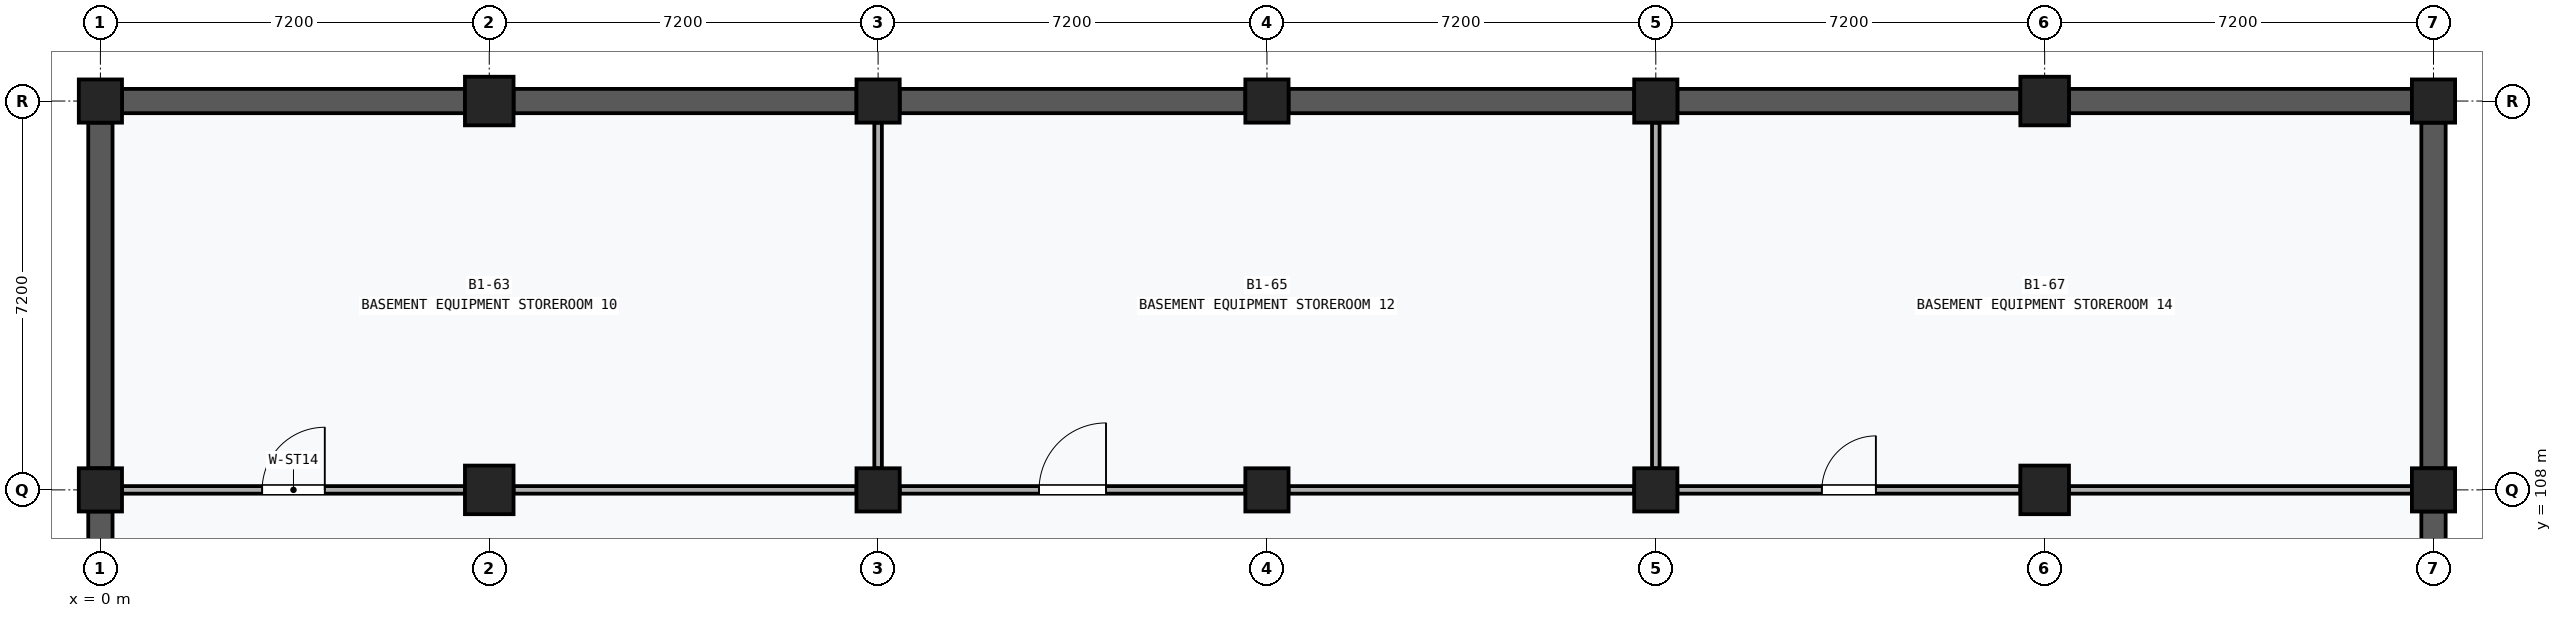
"""IFC4 building model, lengths in metres.
Left out: names, types, materials, properties, quantities, classifications, styles, units other than length and angle.
Written with IfcOpenShell. Run it as: python <this file> out.ifc"""

import sys

from ifc_helpers import new_model, si_unit, direction, frame, frame_2d, origin, origin_2d, place, context, subcontext, project, spatial, rectangle, extrude, element, fill, save


model = new_model("IFC4")
c1 = context("Model", 3, precision=1e-05, world=origin(), true_north=direction((0.0, 1.0)))
c2 = subcontext(c1, "Body", "Model", "MODEL_VIEW")
j1 = project(units=[si_unit("LENGTHUNIT", "METRE"), si_unit("PLANEANGLEUNIT", "RADIAN")], contexts=[c1])
p1 = place(None, origin())
s1 = spatial("IfcSite", under=j1, at=p1, CompositionType="ELEMENT")
p2 = place(p1, origin())
s2 = spatial("IfcBuilding", under=s1, at=p2, CompositionType="ELEMENT")
p3 = place(p2, frame((0.0, 0.0, -4.5)))
s3 = spatial("IfcBuildingStorey", under=s2, at=p3, CompositionType="ELEMENT", Elevation=-4.5)
for number, where, z_axis, x_axis in (
    (1, (0.0, 108.0, 0.0), (0.0, 0.0, 1.0), (1.0, 0.0, 0.0)),
    (2, (0.0, 115.2, 0.0), (0.0, 0.0, 1.0), (1.0, 0.0, 0.0)),
):
    element("IfcColumn", number, at=place(p3, frame(where, z_axis=z_axis, x_axis=x_axis)), inside=s3, PredefinedType="COLUMN", context=c2, shape_type="SweptSolid", body=[
        extrude(rectangle(XDim=0.8, YDim=0.8, at=origin_2d()), origin(), (0.0, 0.0, 1.0), 4.5),
    ])
for number, where, z_axis, x_axis in (
    (3, (7.2, 108.0, 0.0), (0.0, 0.0, 1.0), (1.0, 0.0, 0.0)),
    (4, (7.2, 115.2, 0.0), (0.0, 0.0, 1.0), (1.0, 0.0, 0.0)),
):
    element("IfcColumn", number, at=place(p3, frame(where, z_axis=z_axis, x_axis=x_axis)), inside=s3, PredefinedType="COLUMN", context=c2, shape_type="SweptSolid", body=[
        extrude(rectangle(XDim=0.9, YDim=0.9, at=origin_2d()), origin(), (0.0, 0.0, 1.0), 4.5),
    ])
for number, where, z_axis, x_axis in (
    (5, (14.4, 108.0, 0.0), (0.0, 0.0, 1.0), (1.0, 0.0, 0.0)),
    (6, (14.4, 115.2, 0.0), (0.0, 0.0, 1.0), (1.0, 0.0, 0.0)),
    (7, (21.6, 108.0, 0.0), (0.0, 0.0, 1.0), (1.0, 0.0, 0.0)),
    (8, (21.6, 115.2, 0.0), (0.0, 0.0, 1.0), (1.0, 0.0, 0.0)),
    (9, (28.8, 108.0, 0.0), (0.0, 0.0, 1.0), (1.0, 0.0, 0.0)),
    (10, (28.8, 115.2, 0.0), (0.0, 0.0, 1.0), (1.0, 0.0, 0.0)),
):
    element("IfcColumn", number, at=place(p3, frame(where, z_axis=z_axis, x_axis=x_axis)), inside=s3, PredefinedType="COLUMN", context=c2, shape_type="SweptSolid", body=[
        extrude(rectangle(XDim=0.8, YDim=0.8, at=origin_2d()), origin(), (0.0, 0.0, 1.0), 4.5),
    ])
for number, where, z_axis, x_axis in (
    (11, (36.0, 108.0, 0.0), (0.0, 0.0, 1.0), (1.0, 0.0, 0.0)),
    (12, (36.0, 115.2, 0.0), (0.0, 0.0, 1.0), (1.0, 0.0, 0.0)),
):
    element("IfcColumn", number, at=place(p3, frame(where, z_axis=z_axis, x_axis=x_axis)), inside=s3, PredefinedType="COLUMN", context=c2, shape_type="SweptSolid", body=[
        extrude(rectangle(XDim=0.9, YDim=0.9, at=origin_2d()), origin(), (0.0, 0.0, 1.0), 4.5),
    ])
for number, where, z_axis, x_axis in (
    (13, (43.2, 108.0, 0.0), (0.0, 0.0, 1.0), (1.0, 0.0, 0.0)),
    (14, (43.2, 115.2, 0.0), (0.0, 0.0, 1.0), (1.0, 0.0, 0.0)),
):
    element("IfcColumn", number, at=place(p3, frame(where, z_axis=z_axis, x_axis=x_axis)), inside=s3, PredefinedType="COLUMN", context=c2, shape_type="SweptSolid", body=[
        extrude(rectangle(XDim=0.8, YDim=0.8, at=origin_2d()), origin(), (0.0, 0.0, 1.0), 4.5),
    ])
p4 = place(p3, frame((0.0, 101.2, 0.0), z_axis=(0.0, 0.0, 1.0), x_axis=(0.0, 1.0, 0.0)))
e15 = element("IfcWall", 15, at=p4, inside=s3, PredefinedType="SOLIDWALL", context=c2, shape_type="SweptSolid", body=[
    extrude(rectangle(XDim=6.4, YDim=0.45, at=frame_2d((3.2, 0.0))), origin(), (0.0, 0.0, 1.0), 3.57),
])
p5 = place(p3, frame((0.4, 115.2, 0.0), z_axis=(0.0, 0.0, 1.0), x_axis=(1.0, 0.0, 0.0)))
e16 = element("IfcWall", 16, at=p5, inside=s3, PredefinedType="SOLIDWALL", context=c2, shape_type="SweptSolid", body=[
    extrude(rectangle(XDim=6.35, YDim=0.45, at=frame_2d((3.175, 0.0))), origin(), (0.0, 0.0, 1.0), 3.57),
])
p6 = place(p3, frame((0.0, 108.4, 0.0), z_axis=(0.0, 0.0, 1.0), x_axis=(0.0, 1.0, 0.0)))
e17 = element("IfcWall", 17, at=p6, inside=s3, PredefinedType="SOLIDWALL", context=c2, shape_type="SweptSolid", body=[
    extrude(rectangle(XDim=6.4, YDim=0.45, at=frame_2d((3.2, 0.0))), origin(), (0.0, 0.0, 1.0), 3.57),
])
p7 = place(p3, frame((7.65, 115.2, 0.0), z_axis=(0.0, 0.0, 1.0), x_axis=(1.0, 0.0, 0.0)))
e18 = element("IfcWall", 18, at=p7, inside=s3, PredefinedType="SOLIDWALL", context=c2, shape_type="SweptSolid", body=[
    extrude(rectangle(XDim=6.35, YDim=0.45, at=frame_2d((3.175, 0.0))), origin(), (0.0, 0.0, 1.0), 3.57),
])
for number, where, z_axis, x_axis in (
    (19, (14.8, 115.2, 0.0), (0.0, 0.0, 1.0), (1.0, 0.0, 0.0)),
    (20, (22.0, 115.2, 0.0), (0.0, 0.0, 1.0), (1.0, 0.0, 0.0)),
):
    element("IfcWall", number, at=place(p3, frame(where, z_axis=z_axis, x_axis=x_axis)), inside=s3, PredefinedType="SOLIDWALL", context=c2, shape_type="SweptSolid", body=[
        extrude(rectangle(XDim=6.4, YDim=0.45, at=frame_2d((3.2, 0.0))), origin(), (0.0, 0.0, 1.0), 3.57),
    ])
p8 = place(p3, frame((29.2, 115.2, 0.0), z_axis=(0.0, 0.0, 1.0), x_axis=(1.0, 0.0, 0.0)))
e21 = element("IfcWall", 21, at=p8, inside=s3, PredefinedType="SOLIDWALL", context=c2, shape_type="SweptSolid", body=[
    extrude(rectangle(XDim=6.35, YDim=0.45, at=frame_2d((3.175, 0.0))), origin(), (0.0, 0.0, 1.0), 3.57),
])
p9 = place(p3, frame((43.2, 101.2, 0.0), z_axis=(0.0, 0.0, 1.0), x_axis=(0.0, 1.0, 0.0)))
e22 = element("IfcWall", 22, at=p9, inside=s3, PredefinedType="SOLIDWALL", context=c2, shape_type="SweptSolid", body=[
    extrude(rectangle(XDim=6.4, YDim=0.45, at=frame_2d((3.2, 0.0))), origin(), (0.0, 0.0, 1.0), 3.57),
])
p10 = place(p3, frame((36.45, 115.2, 0.0), z_axis=(0.0, 0.0, 1.0), x_axis=(1.0, 0.0, 0.0)))
e23 = element("IfcWall", 23, at=p10, inside=s3, PredefinedType="SOLIDWALL", context=c2, shape_type="SweptSolid", body=[
    extrude(rectangle(XDim=6.35, YDim=0.45, at=frame_2d((3.175, 0.0))), origin(), (0.0, 0.0, 1.0), 3.57),
])
p11 = place(p3, frame((43.2, 108.4, 0.0), z_axis=(0.0, 0.0, 1.0), x_axis=(0.0, 1.0, 0.0)))
e24 = element("IfcWall", 24, at=p11, inside=s3, PredefinedType="SOLIDWALL", context=c2, shape_type="SweptSolid", body=[
    extrude(rectangle(XDim=6.4, YDim=0.45, at=frame_2d((3.2, 0.0))), origin(), (0.0, 0.0, 1.0), 3.57),
])
p12 = place(p3, frame((0.4, 108.0, 0.0), z_axis=(0.0, 0.0, 1.0), x_axis=(1.0, 0.0, 0.0)))
e25 = element("IfcWall", 25, at=p12, inside=s3, PredefinedType="PARTITIONING", context=c2, shape_type="SweptSolid", body=[
    extrude(rectangle(XDim=6.35, YDim=0.14, at=frame_2d((3.175, 0.0))), origin(), (0.0, 0.0, 1.0), 3.3),
])
p13 = place(p12, frame((2.595, 0.0, 0.0)))
e26 = element("IfcOpeningElement", 26, at=p13, cuts=e25, PredefinedType="OPENING", context=c2, shape_type="SweptSolid", body=[
    extrude(rectangle(XDim=1.16, YDim=2.22, at=frame_2d((0.58, 1.11))), frame((0.0, 0.082, 0.0), z_axis=(0.0, -1.0, 0.0), x_axis=(1.0, 0.0, 0.0)), (0.0, 0.0, 1.0), 0.164),
])
p14 = place(p3, frame((7.65, 108.0, 0.0), z_axis=(0.0, 0.0, 1.0), x_axis=(1.0, 0.0, 0.0)))
e27 = element("IfcWall", 27, at=p14, inside=s3, PredefinedType="PARTITIONING", context=c2, shape_type="SweptSolid", body=[
    extrude(rectangle(XDim=6.35, YDim=0.14, at=frame_2d((3.175, 0.0))), origin(), (0.0, 0.0, 1.0), 3.3),
])
p15 = place(p3, frame((14.4, 108.4, 0.0), z_axis=(0.0, 0.0, 1.0), x_axis=(0.0, 1.0, 0.0)))
e28 = element("IfcWall", 28, at=p15, inside=s3, PredefinedType="PARTITIONING", context=c2, shape_type="SweptSolid", body=[
    extrude(rectangle(XDim=6.4, YDim=0.14, at=frame_2d((3.2, 0.0))), origin(), (0.0, 0.0, 1.0), 3.3),
])
p16 = place(p3, frame((14.8, 108.0, 0.0), z_axis=(0.0, 0.0, 1.0), x_axis=(1.0, 0.0, 0.0)))
e29 = element("IfcWall", 29, at=p16, inside=s3, PredefinedType="PARTITIONING", context=c2, shape_type="SweptSolid", body=[
    extrude(rectangle(XDim=6.4, YDim=0.14, at=frame_2d((3.2, 0.0))), origin(), (0.0, 0.0, 1.0), 3.3),
])
p17 = place(p16, frame((2.58, 0.0, 0.0)))
e30 = element("IfcOpeningElement", 30, at=p17, cuts=e29, PredefinedType="OPENING", context=c2, shape_type="SweptSolid", body=[
    extrude(rectangle(XDim=1.24, YDim=2.26, at=frame_2d((0.62, 1.13))), frame((0.0, 0.082, 0.0), z_axis=(0.0, -1.0, 0.0), x_axis=(1.0, 0.0, 0.0)), (0.0, 0.0, 1.0), 0.164),
])
p18 = place(p3, frame((22.0, 108.0, 0.0), z_axis=(0.0, 0.0, 1.0), x_axis=(1.0, 0.0, 0.0)))
e31 = element("IfcWall", 31, at=p18, inside=s3, PredefinedType="PARTITIONING", context=c2, shape_type="SweptSolid", body=[
    extrude(rectangle(XDim=6.4, YDim=0.14, at=frame_2d((3.2, 0.0))), origin(), (0.0, 0.0, 1.0), 3.3),
])
p19 = place(p3, frame((28.8, 108.4, 0.0), z_axis=(0.0, 0.0, 1.0), x_axis=(0.0, 1.0, 0.0)))
e32 = element("IfcWall", 32, at=p19, inside=s3, PredefinedType="PARTITIONING", context=c2, shape_type="SweptSolid", body=[
    extrude(rectangle(XDim=6.4, YDim=0.14, at=frame_2d((3.2, 0.0))), origin(), (0.0, 0.0, 1.0), 3.3),
])
p20 = place(p3, frame((29.2, 108.0, 0.0), z_axis=(0.0, 0.0, 1.0), x_axis=(1.0, 0.0, 0.0)))
e33 = element("IfcWall", 33, at=p20, inside=s3, PredefinedType="PARTITIONING", context=c2, shape_type="SweptSolid", body=[
    extrude(rectangle(XDim=6.35, YDim=0.14, at=frame_2d((3.175, 0.0))), origin(), (0.0, 0.0, 1.0), 3.3),
])
p21 = place(p20, frame((2.675, 0.0, 0.0)))
e34 = element("IfcOpeningElement", 34, at=p21, cuts=e33, PredefinedType="OPENING", context=c2, shape_type="SweptSolid", body=[
    extrude(rectangle(XDim=1.0, YDim=2.1, at=frame_2d((0.5, 1.05))), frame((0.0, 0.082, 0.0), z_axis=(0.0, -1.0, 0.0), x_axis=(1.0, 0.0, 0.0)), (0.0, 0.0, 1.0), 0.164),
])
p22 = place(p3, frame((36.45, 108.0, 0.0), z_axis=(0.0, 0.0, 1.0), x_axis=(1.0, 0.0, 0.0)))
e35 = element("IfcWall", 35, at=p22, inside=s3, PredefinedType="PARTITIONING", context=c2, shape_type="SweptSolid", body=[
    extrude(rectangle(XDim=6.35, YDim=0.14, at=frame_2d((3.175, 0.0))), origin(), (0.0, 0.0, 1.0), 3.3),
])
p23 = place(p13, origin())
e36 = element("IfcDoor", 36, at=p23, inside=s3, OperationType="SINGLE_SWING_RIGHT", PredefinedType="DOOR", context=c2, shape_type="SweptSolid", body=[
    extrude(rectangle(XDim=1.16, YDim=2.22, at=frame_2d((0.58, 1.11))), frame((0.0, 0.025, 0.0), z_axis=(0.0, -1.0, 0.0), x_axis=(1.0, 0.0, 0.0)), (0.0, 0.0, 1.0), 0.05),
])
fill(e26, e36)
p24 = place(p17, origin())
e37 = element("IfcDoor", 37, at=p24, inside=s3, OperationType="SINGLE_SWING_RIGHT", PredefinedType="DOOR", context=c2, shape_type="SweptSolid", body=[
    extrude(rectangle(XDim=1.24, YDim=2.26, at=frame_2d((0.62, 1.13))), frame((0.0, 0.025, 0.0), z_axis=(0.0, -1.0, 0.0), x_axis=(1.0, 0.0, 0.0)), (0.0, 0.0, 1.0), 0.05),
])
fill(e30, e37)
p25 = place(p21, origin())
e38 = element("IfcDoor", 38, at=p25, inside=s3, OperationType="SINGLE_SWING_RIGHT", PredefinedType="DOOR", context=c2, shape_type="SweptSolid", body=[
    extrude(rectangle(XDim=1.0, YDim=2.1, at=frame_2d((0.5, 1.05))), frame((0.0, 0.025, 0.0), z_axis=(0.0, -1.0, 0.0), x_axis=(1.0, 0.0, 0.0)), (0.0, 0.0, 1.0), 0.05),
])
fill(e34, e38)
save(model, sys.argv[1])
